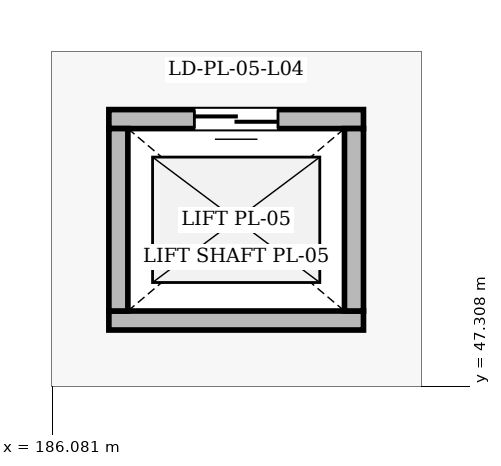
"""IFC4 building model, lengths in metres.
Left out: names, types, materials, properties, quantities, classifications, styles, units other than length and angle.
Written with IfcOpenShell. Run it as: python <this file> out.ifc"""

import sys

from ifc_helpers import new_model, si_unit, direction, frame, frame_2d, origin, place, context, subcontext, project, spatial, rectangle, extrude, element, fill, save


model = new_model("IFC4")
c1 = context("Model", 3, precision=1e-05, world=origin(), true_north=direction((0.0, 1.0)))
c2 = subcontext(c1, "Body", "Model", "MODEL_VIEW")
j1 = project(units=[si_unit("LENGTHUNIT", "METRE"), si_unit("PLANEANGLEUNIT", "RADIAN")], contexts=[c1])
p1 = place(None, origin())
s1 = spatial("IfcSite", under=j1, at=p1, CompositionType="ELEMENT")
p2 = place(p1, origin())
s2 = spatial("IfcBuilding", under=s1, at=p2, CompositionType="ELEMENT")
p3 = place(p2, frame((0.0, 0.0, 20.4)))
s3 = spatial("IfcBuildingStorey", under=s2, at=p3, CompositionType="ELEMENT", Elevation=20.4)
p4 = place(p3, frame((186.825, 48.175, 0.0), z_axis=(0.0, 0.0, 1.0), x_axis=(1.0, 0.0, 0.0)))
e1 = element("IfcWall", 1, at=p4, inside=s3, PredefinedType="SOLIDWALL", context=c2, shape_type="SweptSolid", body=[
    extrude(rectangle(XDim=3.35, YDim=0.25, at=frame_2d((1.675, 0.0))), origin(), (0.0, 0.0, 1.0), 4.088),
])
p5 = place(p3, frame((190.175, 50.825, 0.0), z_axis=(0.0, 0.0, 1.0), x_axis=(-1.0, 0.0, 0.0)))
e2 = element("IfcWall", 2, at=p5, inside=s3, PredefinedType="SOLIDWALL", context=c2, shape_type="SweptSolid", body=[
    extrude(rectangle(XDim=3.35, YDim=0.25, at=frame_2d((1.675, 0.0))), origin(), (0.0, 0.0, 1.0), 4.088),
])
p6 = place(p5, frame((1.125, 0.0, 0.0)))
e3 = element("IfcOpeningElement", 3, at=p6, cuts=e2, PredefinedType="OPENING", context=c2, shape_type="SweptSolid", body=[
    extrude(rectangle(XDim=1.1, YDim=2.2, at=frame_2d((0.55, 1.1))), frame((0.0, 0.135, 0.0), z_axis=(0.0, -1.0, 0.0), x_axis=(1.0, 0.0, 0.0)), (0.0, 0.0, 1.0), 0.27),
])
for number, where, z_axis, x_axis in (
    (4, (186.95, 50.7, 0.0), (0.0, 0.0, 1.0), (0.0, -1.0, 0.0)),
    (5, (190.05, 48.3, 0.0), (0.0, 0.0, 1.0), (0.0, 1.0, 0.0)),
):
    element("IfcWall", number, at=place(p3, frame(where, z_axis=z_axis, x_axis=x_axis)), inside=s3, PredefinedType="SOLIDWALL", context=c2, shape_type="SweptSolid", body=[
        extrude(rectangle(XDim=2.4, YDim=0.25, at=frame_2d((1.2, 0.0))), origin(), (0.0, 0.0, 1.0), 4.56),
    ])
p7 = place(p6, origin())
e6 = element("IfcDoor", 6, at=p7, inside=s3, OperationType="DOUBLE_DOOR_SLIDING", PredefinedType="DOOR", context=c2, shape_type="SweptSolid", body=[
    extrude(rectangle(XDim=1.1, YDim=2.2, at=frame_2d((0.55, 1.1))), frame((0.0, 0.025, 0.0), z_axis=(0.0, -1.0, 0.0), x_axis=(1.0, 0.0, 0.0)), (0.0, 0.0, 1.0), 0.05),
])
fill(e3, e6)
save(model, sys.argv[1])
